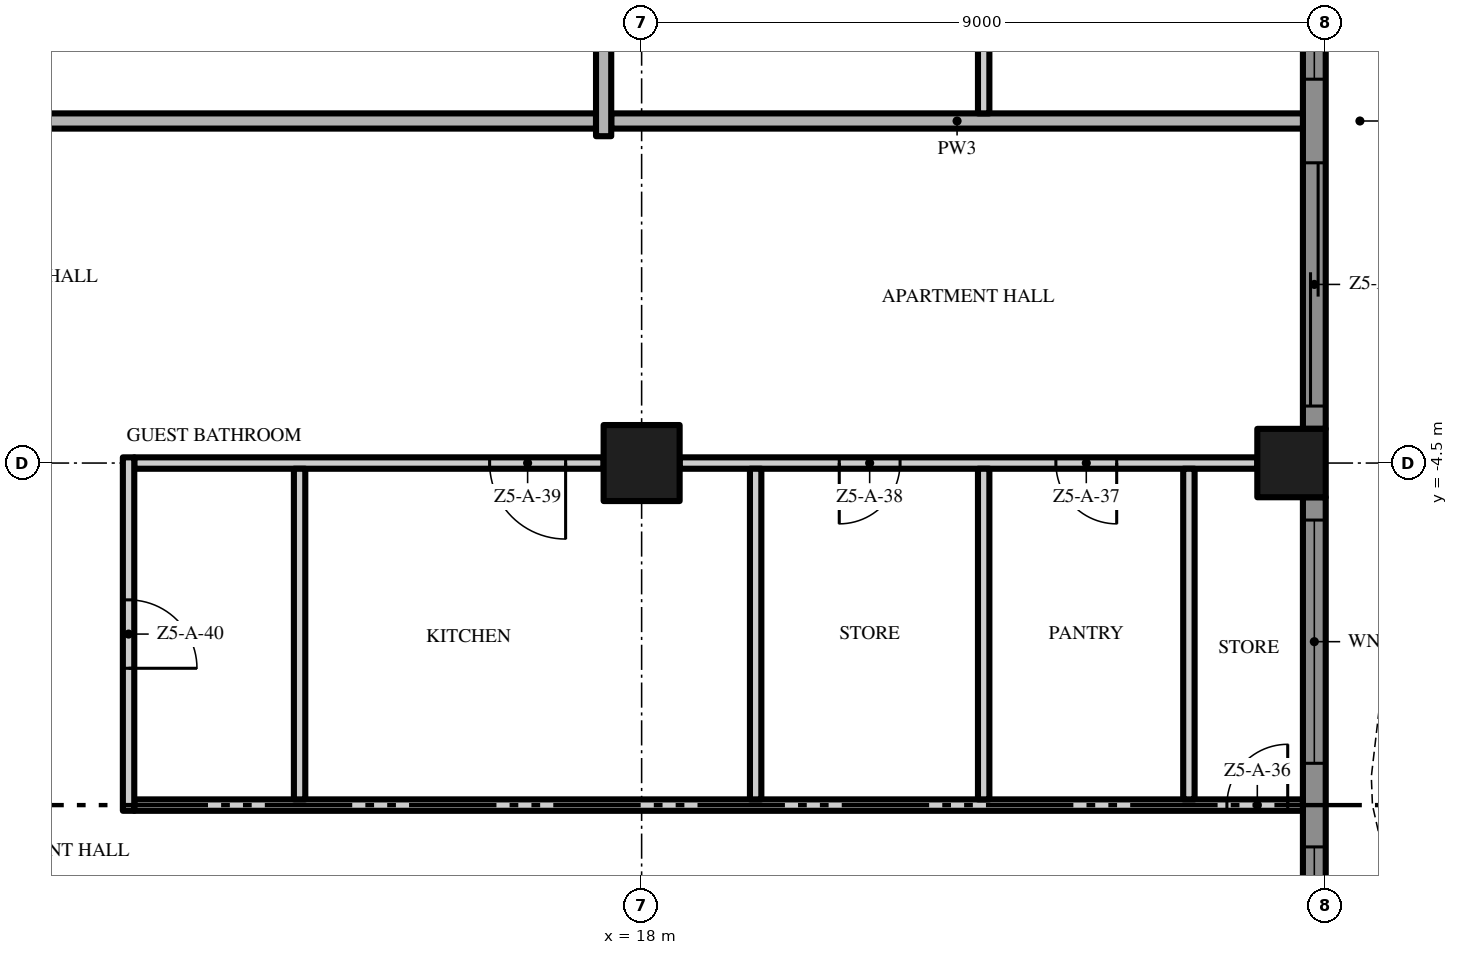
"""IFC4 building model, lengths in metres.
Left out: names, types, materials, properties, quantities, classifications, styles, units other than length and angle.
Written with IfcOpenShell. Run it as: python <this file> out.ifc"""

import sys

from ifc_helpers import new_model, si_unit, direction, frame, frame_2d, origin, origin_2d, place, context, subcontext, project, spatial, polyline, rectangle, outline, extrude, element, fill, save


model = new_model("IFC4")
c1 = context("Model", 3, precision=1e-05, world=origin(), true_north=direction((0.0, 1.0)))
c2 = subcontext(c1, "Body", "Model", "MODEL_VIEW")
j1 = project(units=[si_unit("LENGTHUNIT", "METRE"), si_unit("PLANEANGLEUNIT", "RADIAN")], contexts=[c1])
p1 = place(None, origin())
s1 = spatial("IfcSite", under=j1, at=p1, CompositionType="ELEMENT")
p2 = place(p1, origin())
s2 = spatial("IfcBuilding", under=s1, at=p2, CompositionType="ELEMENT")
p3 = place(p2, frame((0.0, 0.0, 246.4)))
s3 = spatial("IfcBuildingStorey", under=s2, at=p3, CompositionType="ELEMENT", Elevation=246.4)
p4 = place(p3, frame((18.0, -4.5, 0.0), z_axis=(0.0, 0.0, 1.0), x_axis=(1.0, 0.0, 0.0)))
e1 = element("IfcColumn", 1, at=p4, inside=s3, PredefinedType="COLUMN", context=c2, shape_type="SweptSolid", body=[
    extrude(rectangle(XDim=1.0, YDim=1.0, at=origin_2d()), origin(), (0.0, 0.0, 1.0), 3.5),
])
p5 = place(p3, frame((26.55, -4.5, 0.0), z_axis=(0.0, 0.0, 1.0), x_axis=(1.0, 0.0, 0.0)))
e2 = element("IfcColumn", 2, at=p5, inside=s3, PredefinedType="COLUMN", context=c2, shape_type="SweptSolid", body=[
    extrude(rectangle(XDim=0.9, YDim=0.9, at=origin_2d()), origin(), (0.0, 0.0, 1.0), 3.5),
])
p6 = place(p3, frame((26.85, -4.95, 0.0), z_axis=(0.0, 0.0, 1.0), x_axis=(0.0, -1.0, 0.0)))
e3 = element("IfcWall", 3, at=p6, inside=s3, PredefinedType="SOLIDWALL", context=c2, shape_type="SweptSolid", body=[
    extrude(rectangle(XDim=8.1, YDim=0.3, at=frame_2d((4.05, 0.0))), origin(), (0.0, 0.0, 1.0), 3.5),
])
p7 = place(p6, frame((4.6, 0.0, 0.45)))
e4 = element("IfcOpeningElement", 4, at=p7, cuts=e3, PredefinedType="OPENING", context=c2, shape_type="SweptSolid", body=[
    extrude(rectangle(XDim=3.2, YDim=2.65, at=frame_2d((1.6, 1.325))), frame((0.0, 0.16, 0.0), z_axis=(0.0, -1.0, 0.0), x_axis=(1.0, 0.0, 0.0)), (0.0, 0.0, 1.0), 0.32),
])
p8 = place(p6, frame((0.3, 0.0, 0.45)))
e5 = element("IfcOpeningElement", 5, at=p8, cuts=e3, PredefinedType="OPENING", context=c2, shape_type="SweptSolid", body=[
    extrude(rectangle(XDim=3.2, YDim=2.65, at=frame_2d((1.6, 1.325))), frame((0.0, 0.16, 0.0), z_axis=(0.0, -1.0, 0.0), x_axis=(1.0, 0.0, 0.0)), (0.0, 0.0, 1.0), 0.32),
])
p9 = place(p3, frame((26.85, 4.05, 0.0), z_axis=(0.0, 0.0, 1.0), x_axis=(0.0, -1.0, 0.0)))
e6 = element("IfcWall", 6, at=p9, inside=s3, PredefinedType="SOLIDWALL", context=c2, shape_type="SweptSolid", body=[
    extrude(rectangle(XDim=8.1, YDim=0.3, at=frame_2d((4.05, 0.0))), origin(), (0.0, 0.0, 1.0), 3.5),
])
p10 = place(p9, frame((4.6, 0.0, 0.0)))
e7 = element("IfcOpeningElement", 7, at=p10, cuts=e6, PredefinedType="OPENING", context=c2, shape_type="SweptSolid", body=[
    extrude(rectangle(XDim=3.2, YDim=2.4, at=frame_2d((1.6, 1.2))), frame((0.0, 0.16, 0.0), z_axis=(0.0, -1.0, 0.0), x_axis=(1.0, 0.0, 0.0)), (0.0, 0.0, 1.0), 0.32),
])
p11 = place(p9, frame((0.3, 0.0, 0.45)))
e8 = element("IfcOpeningElement", 8, at=p11, cuts=e6, PredefinedType="OPENING", context=c2, shape_type="SweptSolid", body=[
    extrude(rectangle(XDim=3.2, YDim=2.65, at=frame_2d((1.6, 1.325))), frame((0.0, 0.16, 0.0), z_axis=(0.0, -1.0, 0.0), x_axis=(1.0, 0.0, 0.0)), (0.0, 0.0, 1.0), 0.32),
])
p12 = place(p3, origin())
e9 = element("IfcWall", 9, at=p12, inside=s3, PredefinedType="USERDEFINED", context=c2, shape_type="SweptSolid", body=[
    extrude(outline(polyline([(29.649, -18.0), (29.985, -16.5), (30.0, -16.125), (29.869, -15.0), (29.345, -13.5), (28.612, -12.0), (27.951, -10.5), (27.615, -9.0), (27.6, -8.625), (27.731, -7.5), (28.255, -6.0), (28.988, -4.5), (29.649, -3.0), (29.985, -1.5), (30.0, -1.125), (29.869, 0.0), (29.345, 1.5), (28.612, 3.0), (27.951, 4.5), (27.615, 6.0), (27.6, 6.375), (27.731, 7.5), (28.255, 9.0), (28.988, 10.5), (29.649, 12.0), (29.985, 13.5), (30.0, 13.875), (29.869, 15.0), (29.345, 16.5), (28.612, 18.0), (28.388, 17.89), (29.114, 16.404), (29.624, 14.944), (29.749, 13.865), (29.736, 13.533), (29.41, 12.079), (28.761, 10.605), (28.024, 9.096), (27.486, 7.556), (27.349, 6.385), (27.366, 5.967), (27.713, 4.421), (28.385, 2.895), (29.114, 1.404), (29.624, -0.056), (29.749, -1.135), (29.736, -1.467), (29.41, -2.921), (28.761, -4.395), (28.024, -5.904), (27.486, -7.444), (27.349, -8.615), (27.366, -9.033), (27.713, -10.579), (28.385, -12.105), (29.114, -13.596), (29.624, -15.056), (29.749, -16.135), (29.736, -16.467), (29.405, -17.945), (29.649, -18.0)])), origin(), (0.0, 0.0, 1.0), 0.9),
])
p13 = place(p3, frame((11.325, -9.0, 0.0), z_axis=(0.0, 0.0, 1.0), x_axis=(1.0, 0.0, 0.0)))
e10 = element("IfcWall", 10, at=p13, inside=s3, PredefinedType="PARTITIONING", context=c2, shape_type="SweptSolid", body=[
    extrude(rectangle(XDim=15.375, YDim=0.15, at=frame_2d((7.688, 0.0))), origin(), (0.0, 0.0, 1.0), 3.5),
])
p14 = place(p13, frame((14.375, 0.0, 0.0)))
e11 = element("IfcOpeningElement", 11, at=p14, cuts=e10, PredefinedType="OPENING", context=c2, shape_type="SweptSolid", body=[
    extrude(rectangle(XDim=0.8, YDim=2.0, at=frame_2d((0.4, 1.0))), frame((0.0, 0.085, 0.0), z_axis=(0.0, -1.0, 0.0), x_axis=(1.0, 0.0, 0.0)), (0.0, 0.0, 1.0), 0.17),
])
p15 = place(p3, frame((17.5, -4.5, 0.0), z_axis=(0.0, 0.0, 1.0), x_axis=(-1.0, 0.0, 0.0)))
e12 = element("IfcWall", 12, at=p15, inside=s3, PredefinedType="PARTITIONING", context=c2, shape_type="SweptSolid", body=[
    extrude(rectangle(XDim=6.175, YDim=0.15, at=frame_2d((3.087, 0.0))), origin(), (0.0, 0.0, 1.0), 3.5),
])
p16 = place(p15, frame((0.5, 0.0, 0.0)))
e13 = element("IfcOpeningElement", 13, at=p16, cuts=e12, PredefinedType="OPENING", context=c2, shape_type="SweptSolid", body=[
    extrude(rectangle(XDim=1.0, YDim=2.4, at=frame_2d((0.5, 1.2))), frame((0.0, 0.085, 0.0), z_axis=(0.0, -1.0, 0.0), x_axis=(1.0, 0.0, 0.0)), (0.0, 0.0, 1.0), 0.17),
])
p17 = place(p3, frame((26.1, -4.5, 0.0), z_axis=(0.0, 0.0, 1.0), x_axis=(-1.0, 0.0, 0.0)))
e14 = element("IfcWall", 14, at=p17, inside=s3, PredefinedType="PARTITIONING", context=c2, shape_type="SweptSolid", body=[
    extrude(rectangle(XDim=7.6, YDim=0.15, at=frame_2d((3.8, 0.0))), origin(), (0.0, 0.0, 1.0), 3.5),
])
p18 = place(p17, frame((1.85, 0.0, 0.0)))
e15 = element("IfcOpeningElement", 15, at=p18, cuts=e14, PredefinedType="OPENING", context=c2, shape_type="SweptSolid", body=[
    extrude(rectangle(XDim=0.8, YDim=2.0, at=frame_2d((0.4, 1.0))), frame((0.0, 0.085, 0.0), z_axis=(0.0, -1.0, 0.0), x_axis=(1.0, 0.0, 0.0)), (0.0, 0.0, 1.0), 0.17),
])
p19 = place(p17, frame((4.7, 0.0, 0.0)))
e16 = element("IfcOpeningElement", 16, at=p19, cuts=e14, PredefinedType="OPENING", context=c2, shape_type="SweptSolid", body=[
    extrude(rectangle(XDim=0.8, YDim=2.0, at=frame_2d((0.4, 1.0))), frame((0.0, 0.085, 0.0), z_axis=(0.0, -1.0, 0.0), x_axis=(1.0, 0.0, 0.0)), (0.0, 0.0, 1.0), 0.17),
])
p20 = place(p3, frame((17.4, 0.0, 0.0), z_axis=(0.0, 0.0, 1.0), x_axis=(-1.0, 0.0, 0.0)))
e17 = element("IfcWall", 17, at=p20, inside=s3, PredefinedType="PARTITIONING", context=c2, shape_type="SweptSolid", body=[
    extrude(rectangle(XDim=34.8, YDim=0.2, at=frame_2d((17.4, 0.0))), origin(), (0.0, 0.0, 1.0), 3.5),
])
p21 = place(p20, frame((25.65, 0.0, 0.0)))
e18 = element("IfcOpeningElement", 18, at=p21, cuts=e17, PredefinedType="OPENING", context=c2, shape_type="SweptSolid", body=[
    extrude(rectangle(XDim=1.5, YDim=2.4, at=frame_2d((0.75, 1.2))), frame((0.0, 0.11, 0.0), z_axis=(0.0, -1.0, 0.0), x_axis=(1.0, 0.0, 0.0)), (0.0, 0.0, 1.0), 0.22),
])
p22 = place(p20, frame((7.65, 0.0, 0.0)))
e19 = element("IfcOpeningElement", 19, at=p22, cuts=e17, PredefinedType="OPENING", context=c2, shape_type="SweptSolid", body=[
    extrude(rectangle(XDim=1.5, YDim=2.4, at=frame_2d((0.75, 1.2))), frame((0.0, 0.11, 0.0), z_axis=(0.0, -1.0, 0.0), x_axis=(1.0, 0.0, 0.0)), (0.0, 0.0, 1.0), 0.22),
])
p23 = place(p3, frame((17.6, 0.0, 0.0), z_axis=(0.0, 0.0, 1.0), x_axis=(1.0, 0.0, 0.0)))
e20 = element("IfcWall", 20, at=p23, inside=s3, PredefinedType="PARTITIONING", context=c2, shape_type="SweptSolid", body=[
    extrude(rectangle(XDim=9.1, YDim=0.2, at=frame_2d((4.55, 0.0))), origin(), (0.0, 0.0, 1.0), 3.5),
])
p24 = place(p3, frame((11.25, -4.425, 0.0), z_axis=(0.0, 0.0, 1.0), x_axis=(0.0, -1.0, 0.0)))
e21 = element("IfcWall", 21, at=p24, inside=s3, PredefinedType="PARTITIONING", context=c2, shape_type="SweptSolid", body=[
    extrude(rectangle(XDim=4.65, YDim=0.15, at=frame_2d((2.325, 0.0))), origin(), (0.0, 0.0, 1.0), 3.5),
])
p25 = place(p24, frame((1.875, 0.0, 0.0)))
e22 = element("IfcOpeningElement", 22, at=p25, cuts=e21, PredefinedType="OPENING", context=c2, shape_type="SweptSolid", body=[
    extrude(rectangle(XDim=0.9, YDim=2.1, at=frame_2d((0.45, 1.05))), frame((0.0, 0.085, 0.0), z_axis=(0.0, -1.0, 0.0), x_axis=(1.0, 0.0, 0.0)), (0.0, 0.0, 1.0), 0.17),
])
p26 = place(p3, frame((13.5, -8.925, 0.0), z_axis=(0.0, 0.0, 1.0), x_axis=(0.0, 1.0, 0.0)))
e23 = element("IfcWall", 23, at=p26, inside=s3, PredefinedType="PARTITIONING", context=c2, shape_type="SweptSolid", body=[
    extrude(rectangle(XDim=4.35, YDim=0.15, at=frame_2d((2.175, 0.0))), origin(), (0.0, 0.0, 1.0), 3.5),
])
p27 = place(p3, frame((17.5, -0.2, 0.0), z_axis=(0.0, 0.0, 1.0), x_axis=(0.0, 1.0, 0.0)))
e24 = element("IfcWall", 24, at=p27, inside=s3, PredefinedType="PARTITIONING", context=c2, shape_type="SweptSolid", body=[
    extrude(rectangle(XDim=4.2, YDim=0.2, at=frame_2d((2.1, 0.0))), origin(), (0.0, 0.0, 1.0), 3.5),
])
for number, where, z_axis, x_axis in (
    (25, (19.5, -8.925, 0.0), (0.0, 0.0, 1.0), (0.0, 1.0, 0.0)),
    (26, (22.5, -8.925, 0.0), (0.0, 0.0, 1.0), (0.0, 1.0, 0.0)),
):
    element("IfcWall", number, at=place(p3, frame(where, z_axis=z_axis, x_axis=x_axis)), inside=s3, PredefinedType="PARTITIONING", context=c2, shape_type="SweptSolid", body=[
        extrude(rectangle(XDim=4.35, YDim=0.15, at=frame_2d((2.175, 0.0))), origin(), (0.0, 0.0, 1.0), 3.5),
    ])
p28 = place(p3, frame((22.5, 17.55, 0.0), z_axis=(0.0, 0.0, 1.0), x_axis=(0.0, -1.0, 0.0)))
e27 = element("IfcWall", 27, at=p28, inside=s3, PredefinedType="PARTITIONING", context=c2, shape_type="SweptSolid", body=[
    extrude(rectangle(XDim=17.45, YDim=0.15, at=frame_2d((8.725, 0.0))), origin(), (0.0, 0.0, 1.0), 3.5),
])
p29 = place(p28, frame((14.8, 0.0, 0.0)))
e28 = element("IfcOpeningElement", 28, at=p29, cuts=e27, PredefinedType="OPENING", context=c2, shape_type="SweptSolid", body=[
    extrude(rectangle(XDim=1.0, YDim=2.4, at=frame_2d((0.5, 1.2))), frame((0.0, 0.085, 0.0), z_axis=(0.0, -1.0, 0.0), x_axis=(1.0, 0.0, 0.0)), (0.0, 0.0, 1.0), 0.17),
])
p30 = place(p28, frame((11.45, 0.0, 0.0)))
e29 = element("IfcOpeningElement", 29, at=p30, cuts=e27, PredefinedType="OPENING", context=c2, shape_type="SweptSolid", body=[
    extrude(rectangle(XDim=1.0, YDim=2.4, at=frame_2d((0.5, 1.2))), frame((0.0, 0.085, 0.0), z_axis=(0.0, -1.0, 0.0), x_axis=(1.0, 0.0, 0.0)), (0.0, 0.0, 1.0), 0.17),
])
p31 = place(p28, frame((4.3, 0.0, 0.0)))
e30 = element("IfcOpeningElement", 30, at=p31, cuts=e27, PredefinedType="OPENING", context=c2, shape_type="SweptSolid", body=[
    extrude(rectangle(XDim=1.0, YDim=2.4, at=frame_2d((0.5, 1.2))), frame((0.0, 0.085, 0.0), z_axis=(0.0, -1.0, 0.0), x_axis=(1.0, 0.0, 0.0)), (0.0, 0.0, 1.0), 0.17),
])
p32 = place(p3, frame((25.2, -8.925, 0.0), z_axis=(0.0, 0.0, 1.0), x_axis=(0.0, 1.0, 0.0)))
e31 = element("IfcWall", 31, at=p32, inside=s3, PredefinedType="PARTITIONING", context=c2, shape_type="SweptSolid", body=[
    extrude(rectangle(XDim=4.35, YDim=0.15, at=frame_2d((2.175, 0.0))), origin(), (0.0, 0.0, 1.0), 3.5),
])
p33 = place(p7, origin())
e32 = element("IfcWindow", 32, at=p33, inside=s3, PartitioningType="SINGLE_PANEL", PredefinedType="WINDOW", context=c2, shape_type="SweptSolid", body=[
    extrude(rectangle(XDim=3.2, YDim=2.65, at=frame_2d((1.6, 1.325))), frame((0.0, 0.03, 0.0), z_axis=(0.0, -1.0, 0.0), x_axis=(1.0, 0.0, 0.0)), (0.0, 0.0, 1.0), 0.06),
])
fill(e4, e32)
p34 = place(p8, origin())
e33 = element("IfcWindow", 33, at=p34, inside=s3, PartitioningType="SINGLE_PANEL", PredefinedType="WINDOW", context=c2, shape_type="SweptSolid", body=[
    extrude(rectangle(XDim=3.2, YDim=2.65, at=frame_2d((1.6, 1.325))), frame((0.0, 0.03, 0.0), z_axis=(0.0, -1.0, 0.0), x_axis=(1.0, 0.0, 0.0)), (0.0, 0.0, 1.0), 0.06),
])
fill(e5, e33)
p35 = place(p10, origin())
e34 = element("IfcDoor", 34, at=p35, inside=s3, OperationType="SINGLE_SWING_LEFT", PredefinedType="DOOR", context=c2, shape_type="SweptSolid", body=[
    extrude(rectangle(XDim=3.2, YDim=2.4, at=frame_2d((1.6, 1.2))), frame((0.0, 0.025, 0.0), z_axis=(0.0, -1.0, 0.0), x_axis=(1.0, 0.0, 0.0)), (0.0, 0.0, 1.0), 0.05),
])
fill(e7, e34)
p36 = place(p11, origin())
e35 = element("IfcWindow", 35, at=p36, inside=s3, PartitioningType="SINGLE_PANEL", PredefinedType="WINDOW", context=c2, shape_type="SweptSolid", body=[
    extrude(rectangle(XDim=3.2, YDim=2.65, at=frame_2d((1.6, 1.325))), frame((0.0, 0.03, 0.0), z_axis=(0.0, -1.0, 0.0), x_axis=(1.0, 0.0, 0.0)), (0.0, 0.0, 1.0), 0.06),
])
fill(e8, e35)
p37 = place(p14, origin())
e36 = element("IfcDoor", 36, at=p37, inside=s3, OperationType="SINGLE_SWING_RIGHT", PredefinedType="DOOR", context=c2, shape_type="SweptSolid", body=[
    extrude(rectangle(XDim=0.8, YDim=2.0, at=frame_2d((0.4, 1.0))), frame((0.0, 0.025, 0.0), z_axis=(0.0, -1.0, 0.0), x_axis=(1.0, 0.0, 0.0)), (0.0, 0.0, 1.0), 0.05),
])
fill(e11, e36)
p38 = place(p18, origin())
e37 = element("IfcDoor", 37, at=p38, inside=s3, OperationType="SINGLE_SWING_LEFT", PredefinedType="DOOR", context=c2, shape_type="SweptSolid", body=[
    extrude(rectangle(XDim=0.8, YDim=2.0, at=frame_2d((0.4, 1.0))), frame((0.0, 0.025, 0.0), z_axis=(0.0, -1.0, 0.0), x_axis=(1.0, 0.0, 0.0)), (0.0, 0.0, 1.0), 0.05),
])
fill(e15, e37)
p39 = place(p19, origin())
e38 = element("IfcDoor", 38, at=p39, inside=s3, OperationType="SINGLE_SWING_RIGHT", PredefinedType="DOOR", context=c2, shape_type="SweptSolid", body=[
    extrude(rectangle(XDim=0.8, YDim=2.0, at=frame_2d((0.4, 1.0))), frame((0.0, 0.025, 0.0), z_axis=(0.0, -1.0, 0.0), x_axis=(1.0, 0.0, 0.0)), (0.0, 0.0, 1.0), 0.05),
])
fill(e16, e38)
p40 = place(p16, origin())
e39 = element("IfcDoor", 39, at=p40, inside=s3, OperationType="SINGLE_SWING_LEFT", PredefinedType="DOOR", context=c2, shape_type="SweptSolid", body=[
    extrude(rectangle(XDim=1.0, YDim=2.4, at=frame_2d((0.5, 1.2))), frame((0.0, 0.025, 0.0), z_axis=(0.0, -1.0, 0.0), x_axis=(1.0, 0.0, 0.0)), (0.0, 0.0, 1.0), 0.05),
])
fill(e13, e39)
p41 = place(p25, origin())
e40 = element("IfcDoor", 40, at=p41, inside=s3, OperationType="SINGLE_SWING_RIGHT", PredefinedType="DOOR", context=c2, shape_type="SweptSolid", body=[
    extrude(rectangle(XDim=0.9, YDim=2.1, at=frame_2d((0.45, 1.05))), frame((0.0, 0.025, 0.0), z_axis=(0.0, -1.0, 0.0), x_axis=(1.0, 0.0, 0.0)), (0.0, 0.0, 1.0), 0.05),
])
fill(e22, e40)
save(model, sys.argv[1])
